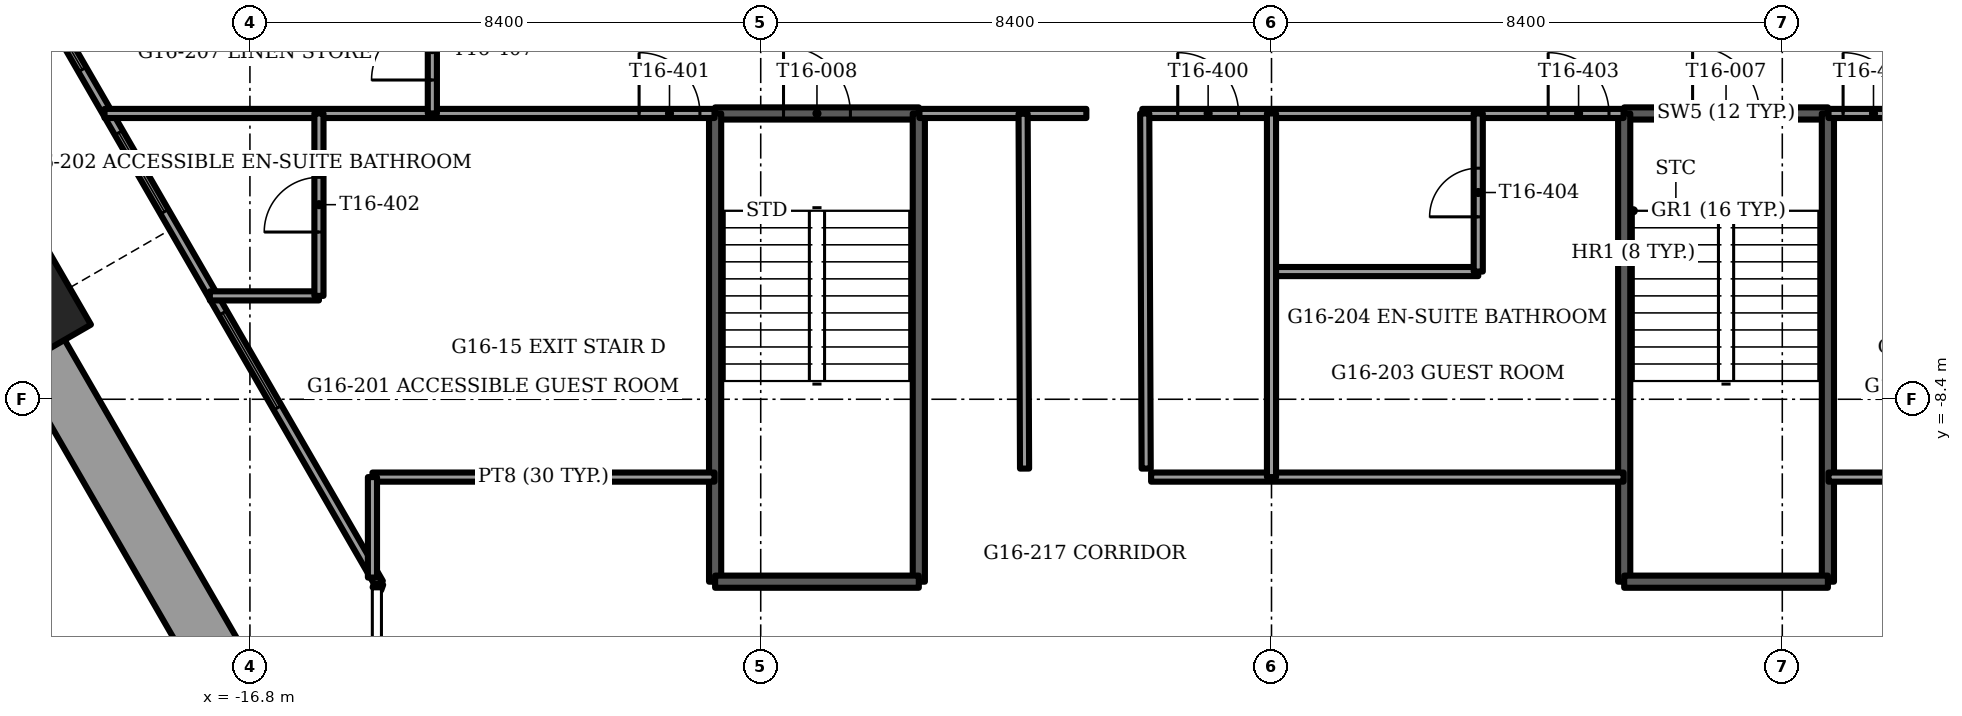
"""IFC4 building model, lengths in metres.
Left out: names, types, materials, properties, quantities, classifications, styles, units other than length and angle.
Written with IfcOpenShell. Run it as: python <this file> out.ifc"""

import sys

from ifc_helpers import new_model, si_unit, direction, frame, frame_2d, origin, origin_2d, place, context, subcontext, project, spatial, rectangle, extrude, element, fill, save


model = new_model("IFC4")
c1 = context("Model", 3, precision=1e-05, world=origin(), true_north=direction((0.0, 1.0)))
c2 = subcontext(c1, "Body", "Model", "MODEL_VIEW")
j1 = project(units=[si_unit("LENGTHUNIT", "METRE"), si_unit("PLANEANGLEUNIT", "RADIAN")], contexts=[c1])
p1 = place(None, origin())
s1 = spatial("IfcSite", under=j1, at=p1, CompositionType="ELEMENT")
p2 = place(p1, origin())
s2 = spatial("IfcBuilding", under=s1, at=p2, CompositionType="ELEMENT")
p3 = place(p2, frame((0.0, 0.0, 65.5)))
s3 = spatial("IfcBuildingStorey", under=s2, at=p3, CompositionType="ELEMENT", Elevation=65.5)
p4 = place(p3, frame((-20.371, -6.917, -1.2), z_axis=(0.0, 0.0, 1.0), x_axis=(-0.5, 0.866025403784, 0.0)))
e1 = element("IfcColumn", 1, at=p4, inside=s3, PredefinedType="COLUMN", context=c2, shape_type="SweptSolid", body=[
    extrude(rectangle(XDim=1.4, YDim=1.4, at=origin_2d()), origin(), (0.0, 0.0, 1.0), 3.75),
])
p5 = place(p3, frame((-20.252, -7.622, 0.0), z_axis=(0.0, 0.0, 1.0), x_axis=(0.499997206141, -0.866027016814, 0.0)))
e2 = element("IfcWall", 2, at=p5, inside=s3, PredefinedType="PARAPET", context=c2, shape_type="SweptSolid", body=[
    extrude(rectangle(XDim=7.051, YDim=0.9, at=frame_2d((3.525, 0.0))), origin(), (0.0, 0.0, 1.0), 1.1),
])
p6 = place(p3, frame((-20.496, -1.351, 0.0), z_axis=(0.0, 0.0, 1.0), x_axis=(0.500010091595, -0.866019577321, 0.0)))
e3 = element("IfcWall", 3, at=p6, inside=s3, PredefinedType="SOLIDWALL", context=c2, shape_type="SweptSolid", body=[
    extrude(rectangle(XDim=11.633, YDim=0.15, at=frame_2d((5.816, 0.0))), origin(), (0.0, 0.0, 1.0), 3.45),
])
p7 = place(p6, frame((0.978, 0.0, 0.15)))
e4 = element("IfcOpeningElement", 4, at=p7, cuts=e3, PredefinedType="OPENING", context=c2, shape_type="SweptSolid", body=[
    extrude(rectangle(XDim=0.9, YDim=2.2, at=frame_2d((0.45, 1.1))), frame((0.0, 0.075, 0.0), z_axis=(0.0, -1.0, 0.0), x_axis=(1.0, 0.0, 0.0)), (0.0, 0.0, 1.0), 0.15),
])
p8 = place(p6, frame((3.078, 0.0, 0.15)))
e5 = element("IfcOpeningElement", 5, at=p8, cuts=e3, PredefinedType="OPENING", context=c2, shape_type="SweptSolid", body=[
    extrude(rectangle(XDim=1.5, YDim=2.2, at=frame_2d((0.75, 1.1))), frame((0.0, 0.075, 0.0), z_axis=(0.0, -1.0, 0.0), x_axis=(1.0, 0.0, 0.0)), (0.0, 0.0, 1.0), 0.15),
])
p9 = place(p6, frame((6.501, 0.0, 0.15)))
e6 = element("IfcOpeningElement", 6, at=p9, cuts=e3, PredefinedType="OPENING", context=c2, shape_type="SweptSolid", body=[
    extrude(rectangle(XDim=1.8, YDim=2.2, at=frame_2d((0.9, 1.1))), frame((0.0, 0.075, 0.0), z_axis=(0.0, -1.0, 0.0), x_axis=(1.0, 0.0, 0.0)), (0.0, 0.0, 1.0), 0.15),
])
p10 = place(p3, frame((-14.679, -11.425, 0.0), z_axis=(0.0, 0.0, 1.0), x_axis=(-0.338543167143, -0.940950861619, 0.0)))
e7 = element("IfcWall", 7, at=p10, inside=s3, PredefinedType="SOLIDWALL", context=c2, shape_type="SweptSolid", body=[
    extrude(rectangle(XDim=0.098, YDim=0.15, at=frame_2d((0.049, 0.0))), origin(), (0.0, 0.0, 1.0), 3.45),
])
p11 = place(p3, frame((5.8, -3.7, -0.3), z_axis=(0.0, 0.0, 1.0), x_axis=(1.0, 0.0, 0.0)))
e8 = element("IfcWall", 8, at=p11, inside=s3, PredefinedType="SOLIDWALL", context=c2, shape_type="SweptSolid", body=[
    extrude(rectangle(XDim=3.35, YDim=0.2, at=frame_2d((1.675, 0.0))), origin(), (0.0, 0.0, 1.0), 3.75),
])
p12 = place(p11, frame((1.125, 0.0, 0.0)))
e9 = element("IfcOpeningElement", 9, at=p12, cuts=e8, PredefinedType="OPENING", context=c2, shape_type="SweptSolid", body=[
    extrude(rectangle(XDim=1.1, YDim=2.1, at=frame_2d((0.55, 1.05))), frame((0.0, 0.1, 0.0), z_axis=(0.0, -1.0, 0.0), x_axis=(1.0, 0.0, 0.0)), (0.0, 0.0, 1.0), 0.2),
])
for number, where, z_axis, x_axis in (
    (10, (5.8, -3.7, -0.3), (0.0, 0.0, 1.0), (0.0, -1.0, 0.0)),
    (11, (9.15, -3.7, -0.3), (0.0, 0.0, 1.0), (0.0, -1.0, 0.0)),
):
    element("IfcWall", number, at=place(p3, frame(where, z_axis=z_axis, x_axis=x_axis)), inside=s3, PredefinedType="SOLIDWALL", context=c2, shape_type="SweptSolid", body=[
        extrude(rectangle(XDim=7.7, YDim=0.2, at=frame_2d((3.85, 0.0))), origin(), (0.0, 0.0, 1.0), 3.75),
    ])
p13 = place(p3, frame((5.8, -11.4, -0.3), z_axis=(0.0, 0.0, 1.0), x_axis=(1.0, 0.0, 0.0)))
e12 = element("IfcWall", 12, at=p13, inside=s3, PredefinedType="SOLIDWALL", context=c2, shape_type="SweptSolid", body=[
    extrude(rectangle(XDim=3.35, YDim=0.2, at=frame_2d((1.675, 0.0))), origin(), (0.0, 0.0, 1.0), 3.75),
])
p14 = place(p3, frame((-9.15, -3.7, -0.3), z_axis=(0.0, 0.0, 1.0), x_axis=(1.0, 0.0, 0.0)))
e13 = element("IfcWall", 13, at=p14, inside=s3, PredefinedType="SOLIDWALL", context=c2, shape_type="SweptSolid", body=[
    extrude(rectangle(XDim=3.35, YDim=0.2, at=frame_2d((1.675, 0.0))), origin(), (0.0, 0.0, 1.0), 3.75),
])
p15 = place(p14, frame((1.125, 0.0, 0.0)))
e14 = element("IfcOpeningElement", 14, at=p15, cuts=e13, PredefinedType="OPENING", context=c2, shape_type="SweptSolid", body=[
    extrude(rectangle(XDim=1.1, YDim=2.1, at=frame_2d((0.55, 1.05))), frame((0.0, 0.1, 0.0), z_axis=(0.0, -1.0, 0.0), x_axis=(1.0, 0.0, 0.0)), (0.0, 0.0, 1.0), 0.2),
])
for number, where, z_axis, x_axis in (
    (15, (-9.15, -3.7, -0.3), (0.0, 0.0, 1.0), (0.0, -1.0, 0.0)),
    (16, (-5.8, -3.7, -0.3), (0.0, 0.0, 1.0), (0.0, -1.0, 0.0)),
):
    element("IfcWall", number, at=place(p3, frame(where, z_axis=z_axis, x_axis=x_axis)), inside=s3, PredefinedType="SOLIDWALL", context=c2, shape_type="SweptSolid", body=[
        extrude(rectangle(XDim=7.7, YDim=0.2, at=frame_2d((3.85, 0.0))), origin(), (0.0, 0.0, 1.0), 3.75),
    ])
p16 = place(p3, frame((-9.15, -11.4, -0.3), z_axis=(0.0, 0.0, 1.0), x_axis=(1.0, 0.0, 0.0)))
e17 = element("IfcWall", 17, at=p16, inside=s3, PredefinedType="SOLIDWALL", context=c2, shape_type="SweptSolid", body=[
    extrude(rectangle(XDim=3.35, YDim=0.2, at=frame_2d((1.675, 0.0))), origin(), (0.0, 0.0, 1.0), 3.75),
])
p17 = place(p3, frame((-14.785, -9.68, 0.0), z_axis=(0.0, 0.0, 1.0), x_axis=(1.0, 0.0, 0.0)))
e18 = element("IfcWall", 18, at=p17, inside=s3, PredefinedType="PARTITIONING", context=c2, shape_type="SweptSolid", body=[
    extrude(rectangle(XDim=5.625, YDim=0.15, at=frame_2d((2.812, 0.0))), origin(), (0.0, 0.0, 1.0), 3.45),
])
p18 = place(p3, frame((-1.98, -9.68, 0.0), z_axis=(0.0, 0.0, 1.0), x_axis=(1.0, 0.0, 0.0)))
e19 = element("IfcWall", 19, at=p18, inside=s3, PredefinedType="PARTITIONING", context=c2, shape_type="SweptSolid", body=[
    extrude(rectangle(XDim=7.77, YDim=0.15, at=frame_2d((3.885, 0.0))), origin(), (0.0, 0.0, 1.0), 3.45),
])
p19 = place(p3, frame((9.16, -9.68, 0.0), z_axis=(0.0, 0.0, 1.0), x_axis=(1.0, 0.0, 0.0)))
e20 = element("IfcWall", 20, at=p19, inside=s3, PredefinedType="PARTITIONING", context=c2, shape_type="SweptSolid", body=[
    extrude(rectangle(XDim=5.625, YDim=0.15, at=frame_2d((2.812, 0.0))), origin(), (0.0, 0.0, 1.0), 3.45),
])
p20 = place(p3, frame((-17.459, -6.7, 0.0), z_axis=(0.0, 0.0, 1.0), x_axis=(1.0, 0.0, 0.0)))
e21 = element("IfcWall", 21, at=p20, inside=s3, PredefinedType="PARTITIONING", context=c2, shape_type="SweptSolid", body=[
    extrude(rectangle(XDim=1.794, YDim=0.15, at=frame_2d((0.897, 0.0))), origin(), (0.0, 0.0, 1.0), 3.45),
])
p21 = place(p3, frame((0.0, -6.3, 0.0), z_axis=(0.0, 0.0, 1.0), x_axis=(1.0, 0.0, 0.0)))
e22 = element("IfcWall", 22, at=p21, inside=s3, PredefinedType="PARTITIONING", context=c2, shape_type="SweptSolid", body=[
    extrude(rectangle(XDim=3.4, YDim=0.15, at=frame_2d((1.7, 0.0))), origin(), (0.0, 0.0, 1.0), 3.45),
])
p22 = place(p3, frame((-19.191, -3.7, 0.0), z_axis=(0.0, 0.0, 1.0), x_axis=(1.0, 0.0, 0.0)))
e23 = element("IfcWall", 23, at=p22, inside=s3, PredefinedType="PARTITIONING", context=c2, shape_type="SweptSolid", body=[
    extrude(rectangle(XDim=10.031, YDim=0.15, at=frame_2d((5.016, 0.0))), origin(), (0.0, 0.0, 1.0), 3.45),
])
p23 = place(p22, frame((8.791, 0.0, 0.0)))
e24 = element("IfcOpeningElement", 24, at=p23, cuts=e23, PredefinedType="OPENING", context=c2, shape_type="SweptSolid", body=[
    extrude(rectangle(XDim=1.0, YDim=2.1, at=frame_2d((0.5, 1.05))), frame((0.0, 0.075, 0.0), z_axis=(0.0, -1.0, 0.0), x_axis=(1.0, 0.0, 0.0)), (0.0, 0.0, 1.0), 0.15),
])
p24 = place(p3, frame((-5.79, -3.7, 0.0), z_axis=(0.0, 0.0, 1.0), x_axis=(1.0, 0.0, 0.0)))
e25 = element("IfcWall", 25, at=p24, inside=s3, PredefinedType="PARTITIONING", context=c2, shape_type="SweptSolid", body=[
    extrude(rectangle(XDim=2.745, YDim=0.15, at=frame_2d((1.373, 0.0))), origin(), (0.0, 0.0, 1.0), 3.45),
])
p25 = place(p3, frame((-2.125, -3.7, 0.0), z_axis=(0.0, 0.0, 1.0), x_axis=(1.0, 0.0, 0.0)))
e26 = element("IfcWall", 26, at=p25, inside=s3, PredefinedType="PARTITIONING", context=c2, shape_type="SweptSolid", body=[
    extrude(rectangle(XDim=7.915, YDim=0.15, at=frame_2d((3.958, 0.0))), origin(), (0.0, 0.0, 1.0), 3.45),
])
p26 = place(p25, frame((0.583, 0.0, 0.0)))
e27 = element("IfcOpeningElement", 27, at=p26, cuts=e26, PredefinedType="OPENING", context=c2, shape_type="SweptSolid", body=[
    extrude(rectangle(XDim=1.0, YDim=2.1, at=frame_2d((0.5, 1.05))), frame((0.0, 0.075, 0.0), z_axis=(0.0, -1.0, 0.0), x_axis=(1.0, 0.0, 0.0)), (0.0, 0.0, 1.0), 0.15),
])
p27 = place(p25, frame((6.675, 0.0, 0.0)))
e28 = element("IfcOpeningElement", 28, at=p27, cuts=e26, PredefinedType="OPENING", context=c2, shape_type="SweptSolid", body=[
    extrude(rectangle(XDim=1.0, YDim=2.1, at=frame_2d((0.5, 1.05))), frame((0.0, 0.075, 0.0), z_axis=(0.0, -1.0, 0.0), x_axis=(1.0, 0.0, 0.0)), (0.0, 0.0, 1.0), 0.15),
])
p28 = place(p3, frame((9.16, -3.7, 0.0), z_axis=(0.0, 0.0, 1.0), x_axis=(1.0, 0.0, 0.0)))
e29 = element("IfcWall", 29, at=p28, inside=s3, PredefinedType="PARTITIONING", context=c2, shape_type="SweptSolid", body=[
    extrude(rectangle(XDim=10.031, YDim=0.15, at=frame_2d((5.016, 0.0))), origin(), (0.0, 0.0, 1.0), 3.45),
])
p29 = place(p28, frame((0.24, 0.0, 0.0)))
e30 = element("IfcOpeningElement", 30, at=p29, cuts=e29, PredefinedType="OPENING", context=c2, shape_type="SweptSolid", body=[
    extrude(rectangle(XDim=1.0, YDim=2.1, at=frame_2d((0.5, 1.05))), frame((0.0, 0.075, 0.0), z_axis=(0.0, -1.0, 0.0), x_axis=(1.0, 0.0, 0.0)), (0.0, 0.0, 1.0), 0.15),
])
p30 = place(p3, frame((3.4, -6.3, 0.0), z_axis=(0.0, 0.0, 1.0), x_axis=(0.0, 1.0, 0.0)))
e31 = element("IfcWall", 31, at=p30, inside=s3, PredefinedType="PARTITIONING", context=c2, shape_type="SweptSolid", body=[
    extrude(rectangle(XDim=2.6, YDim=0.15, at=frame_2d((1.3, 0.0))), origin(), (0.0, 0.0, 1.0), 3.45),
])
p31 = place(p30, frame((0.9, 0.0, 0.0)))
e32 = element("IfcOpeningElement", 32, at=p31, cuts=e31, PredefinedType="OPENING", context=c2, shape_type="SweptSolid", body=[
    extrude(rectangle(XDim=0.8, YDim=2.1, at=frame_2d((0.4, 1.05))), frame((0.0, 0.075, 0.0), z_axis=(0.0, -1.0, 0.0), x_axis=(1.0, 0.0, 0.0)), (0.0, 0.0, 1.0), 0.15),
])
p32 = place(p3, frame((0.0, -9.68, 0.0), z_axis=(0.0, 0.0, 1.0), x_axis=(0.0, 1.0, 0.0)))
e33 = element("IfcWall", 33, at=p32, inside=s3, PredefinedType="PARTITIONING", context=c2, shape_type="SweptSolid", body=[
    extrude(rectangle(XDim=5.98, YDim=0.15, at=frame_2d((2.99, 0.0))), origin(), (0.0, 0.0, 1.0), 3.45),
])
p33 = place(p3, frame((-13.8, -3.7, 0.0), z_axis=(0.0, 0.0, 1.0), x_axis=(0.0, 1.0, 0.0)))
e34 = element("IfcWall", 34, at=p33, inside=s3, PredefinedType="PARTITIONING", context=c2, shape_type="SweptSolid", body=[
    extrude(rectangle(XDim=11.415, YDim=0.15, at=frame_2d((5.708, 0.0))), origin(), (0.0, 0.0, 1.0), 3.45),
])
p34 = place(p33, frame((0.55, 0.0, 0.0)))
e35 = element("IfcOpeningElement", 35, at=p34, cuts=e34, PredefinedType="OPENING", context=c2, shape_type="SweptSolid", body=[
    extrude(rectangle(XDim=1.0, YDim=2.1, at=frame_2d((0.5, 1.05))), frame((0.0, 0.075, 0.0), z_axis=(0.0, -1.0, 0.0), x_axis=(1.0, 0.0, 0.0)), (0.0, 0.0, 1.0), 0.15),
])
p35 = place(p33, frame((5.05, 0.0, 0.0)))
e36 = element("IfcOpeningElement", 36, at=p35, cuts=e34, PredefinedType="OPENING", context=c2, shape_type="SweptSolid", body=[
    extrude(rectangle(XDim=1.0, YDim=2.1, at=frame_2d((0.5, 1.05))), frame((0.0, 0.075, 0.0), z_axis=(0.0, -1.0, 0.0), x_axis=(1.0, 0.0, 0.0)), (0.0, 0.0, 1.0), 0.15),
])
p36 = place(p33, frame((8.358, 0.0, 0.0)))
e37 = element("IfcOpeningElement", 37, at=p36, cuts=e34, PredefinedType="OPENING", context=c2, shape_type="SweptSolid", body=[
    extrude(rectangle(XDim=1.0, YDim=2.1, at=frame_2d((0.5, 1.05))), frame((0.0, 0.075, 0.0), z_axis=(0.0, -1.0, 0.0), x_axis=(1.0, 0.0, 0.0)), (0.0, 0.0, 1.0), 0.15),
])
p37 = place(p3, frame((-14.785, -11.332, 0.0), z_axis=(0.0, 0.0, 1.0), x_axis=(0.0, 1.0, 0.0)))
e38 = element("IfcWall", 38, at=p37, inside=s3, PredefinedType="PARTITIONING", context=c2, shape_type="SweptSolid", body=[
    extrude(rectangle(XDim=1.652, YDim=0.15, at=frame_2d((0.826, 0.0))), origin(), (0.0, 0.0, 1.0), 3.45),
])
p38 = place(p3, frame((-15.665, -6.7, 0.0), z_axis=(0.0, 0.0, 1.0), x_axis=(0.0, 1.0, 0.0)))
e39 = element("IfcWall", 39, at=p38, inside=s3, PredefinedType="PARTITIONING", context=c2, shape_type="SweptSolid", body=[
    extrude(rectangle(XDim=3.0, YDim=0.15, at=frame_2d((1.5, 0.0))), origin(), (0.0, 0.0, 1.0), 3.45),
])
p39 = place(p38, frame((1.05, 0.0, 0.0)))
e40 = element("IfcOpeningElement", 40, at=p39, cuts=e39, PredefinedType="OPENING", context=c2, shape_type="SweptSolid", body=[
    extrude(rectangle(XDim=0.9, YDim=2.1, at=frame_2d((0.45, 1.05))), frame((0.0, 0.075, 0.0), z_axis=(0.0, -1.0, 0.0), x_axis=(1.0, 0.0, 0.0)), (0.0, 0.0, 1.0), 0.15),
])
p40 = place(p3, frame((-2.061, -9.54, 0.0), z_axis=(0.0, 0.0, 1.0), x_axis=(-0.004096784315, 0.999991608144, 0.0)))
e41 = element("IfcWall", 41, at=p40, inside=s3, PredefinedType="PARTITIONING", context=c2, shape_type="SweptSolid", body=[
    extrude(rectangle(XDim=5.84, YDim=0.15, at=frame_2d((2.92, 0.0))), origin(), (0.0, 0.0, 1.0), 3.45),
])
p41 = place(p3, frame((-4.061, -9.54, 0.0), z_axis=(0.0, 0.0, 1.0), x_axis=(-0.004100383939, 0.99999159339, 0.0)))
e42 = element("IfcWall", 42, at=p41, inside=s3, PredefinedType="PARTITIONING", context=c2, shape_type="SweptSolid", body=[
    extrude(rectangle(XDim=5.835, YDim=0.15, at=frame_2d((2.917, 0.0))), origin(), (0.0, 0.0, 1.0), 3.45),
])
p42 = place(p7, origin())
e43 = element("IfcWindow", 43, at=p42, inside=s3, PartitioningType="SINGLE_PANEL", PredefinedType="WINDOW", context=c2, shape_type="SweptSolid", body=[
    extrude(rectangle(XDim=0.9, YDim=2.2, at=frame_2d((0.45, 1.1))), frame((0.0, 0.03, 0.0), z_axis=(0.0, -1.0, 0.0), x_axis=(1.0, 0.0, 0.0)), (0.0, 0.0, 1.0), 0.06),
])
fill(e4, e43)
p43 = place(p8, origin())
e44 = element("IfcWindow", 44, at=p43, inside=s3, PartitioningType="SINGLE_PANEL", PredefinedType="WINDOW", context=c2, shape_type="SweptSolid", body=[
    extrude(rectangle(XDim=1.5, YDim=2.2, at=frame_2d((0.75, 1.1))), frame((0.0, 0.03, 0.0), z_axis=(0.0, -1.0, 0.0), x_axis=(1.0, 0.0, 0.0)), (0.0, 0.0, 1.0), 0.06),
])
fill(e5, e44)
p44 = place(p9, origin())
e45 = element("IfcWindow", 45, at=p44, inside=s3, PartitioningType="SINGLE_PANEL", PredefinedType="WINDOW", context=c2, shape_type="SweptSolid", body=[
    extrude(rectangle(XDim=1.8, YDim=2.2, at=frame_2d((0.9, 1.1))), frame((0.0, 0.03, 0.0), z_axis=(0.0, -1.0, 0.0), x_axis=(1.0, 0.0, 0.0)), (0.0, 0.0, 1.0), 0.06),
])
fill(e6, e45)
p45 = place(p12, origin())
e46 = element("IfcDoor", 46, at=p45, inside=s3, OperationType="SINGLE_SWING_LEFT", PredefinedType="DOOR", context=c2, shape_type="SweptSolid", body=[
    extrude(rectangle(XDim=1.1, YDim=2.1, at=frame_2d((0.55, 1.05))), frame((0.0, 0.025, 0.0), z_axis=(0.0, -1.0, 0.0), x_axis=(1.0, 0.0, 0.0)), (0.0, 0.0, 1.0), 0.05),
])
fill(e9, e46)
p46 = place(p15, origin())
e47 = element("IfcDoor", 47, at=p46, inside=s3, OperationType="SINGLE_SWING_LEFT", PredefinedType="DOOR", context=c2, shape_type="SweptSolid", body=[
    extrude(rectangle(XDim=1.1, YDim=2.1, at=frame_2d((0.55, 1.05))), frame((0.0, 0.025, 0.0), z_axis=(0.0, -1.0, 0.0), x_axis=(1.0, 0.0, 0.0)), (0.0, 0.0, 1.0), 0.05),
])
fill(e14, e47)
p47 = place(p26, origin())
e48 = element("IfcDoor", 48, at=p47, inside=s3, OperationType="SINGLE_SWING_RIGHT", PredefinedType="DOOR", context=c2, shape_type="SweptSolid", body=[
    extrude(rectangle(XDim=1.0, YDim=2.1, at=frame_2d((0.5, 1.05))), frame((0.0, 0.025, 0.0), z_axis=(0.0, -1.0, 0.0), x_axis=(1.0, 0.0, 0.0)), (0.0, 0.0, 1.0), 0.05),
])
fill(e27, e48)
p48 = place(p23, origin())
e49 = element("IfcDoor", 49, at=p48, inside=s3, OperationType="SINGLE_SWING_RIGHT", PredefinedType="DOOR", context=c2, shape_type="SweptSolid", body=[
    extrude(rectangle(XDim=1.0, YDim=2.1, at=frame_2d((0.5, 1.05))), frame((0.0, 0.025, 0.0), z_axis=(0.0, -1.0, 0.0), x_axis=(1.0, 0.0, 0.0)), (0.0, 0.0, 1.0), 0.05),
])
fill(e24, e49)
p49 = place(p39, origin())
e50 = element("IfcDoor", 50, at=p49, inside=s3, OperationType="SINGLE_SWING_RIGHT", PredefinedType="DOOR", context=c2, shape_type="SweptSolid", body=[
    extrude(rectangle(XDim=0.9, YDim=2.1, at=frame_2d((0.45, 1.05))), frame((0.0, 0.025, 0.0), z_axis=(0.0, -1.0, 0.0), x_axis=(1.0, 0.0, 0.0)), (0.0, 0.0, 1.0), 0.05),
])
fill(e40, e50)
p50 = place(p27, origin())
e51 = element("IfcDoor", 51, at=p50, inside=s3, OperationType="SINGLE_SWING_RIGHT", PredefinedType="DOOR", context=c2, shape_type="SweptSolid", body=[
    extrude(rectangle(XDim=1.0, YDim=2.1, at=frame_2d((0.5, 1.05))), frame((0.0, 0.025, 0.0), z_axis=(0.0, -1.0, 0.0), x_axis=(1.0, 0.0, 0.0)), (0.0, 0.0, 1.0), 0.05),
])
fill(e28, e51)
p51 = place(p31, origin())
e52 = element("IfcDoor", 52, at=p51, inside=s3, OperationType="SINGLE_SWING_RIGHT", PredefinedType="DOOR", context=c2, shape_type="SweptSolid", body=[
    extrude(rectangle(XDim=0.8, YDim=2.1, at=frame_2d((0.4, 1.05))), frame((0.0, 0.025, 0.0), z_axis=(0.0, -1.0, 0.0), x_axis=(1.0, 0.0, 0.0)), (0.0, 0.0, 1.0), 0.05),
])
fill(e32, e52)
p52 = place(p29, origin())
e53 = element("IfcDoor", 53, at=p52, inside=s3, OperationType="SINGLE_SWING_LEFT", PredefinedType="DOOR", context=c2, shape_type="SweptSolid", body=[
    extrude(rectangle(XDim=1.0, YDim=2.1, at=frame_2d((0.5, 1.05))), frame((0.0, 0.025, 0.0), z_axis=(0.0, -1.0, 0.0), x_axis=(1.0, 0.0, 0.0)), (0.0, 0.0, 1.0), 0.05),
])
fill(e30, e53)
p53 = place(p34, origin())
e54 = element("IfcDoor", 54, at=p53, inside=s3, OperationType="SINGLE_SWING_LEFT", PredefinedType="DOOR", context=c2, shape_type="SweptSolid", body=[
    extrude(rectangle(XDim=1.0, YDim=2.1, at=frame_2d((0.5, 1.05))), frame((0.0, 0.025, 0.0), z_axis=(0.0, -1.0, 0.0), x_axis=(1.0, 0.0, 0.0)), (0.0, 0.0, 1.0), 0.05),
])
fill(e35, e54)
save(model, sys.argv[1])
